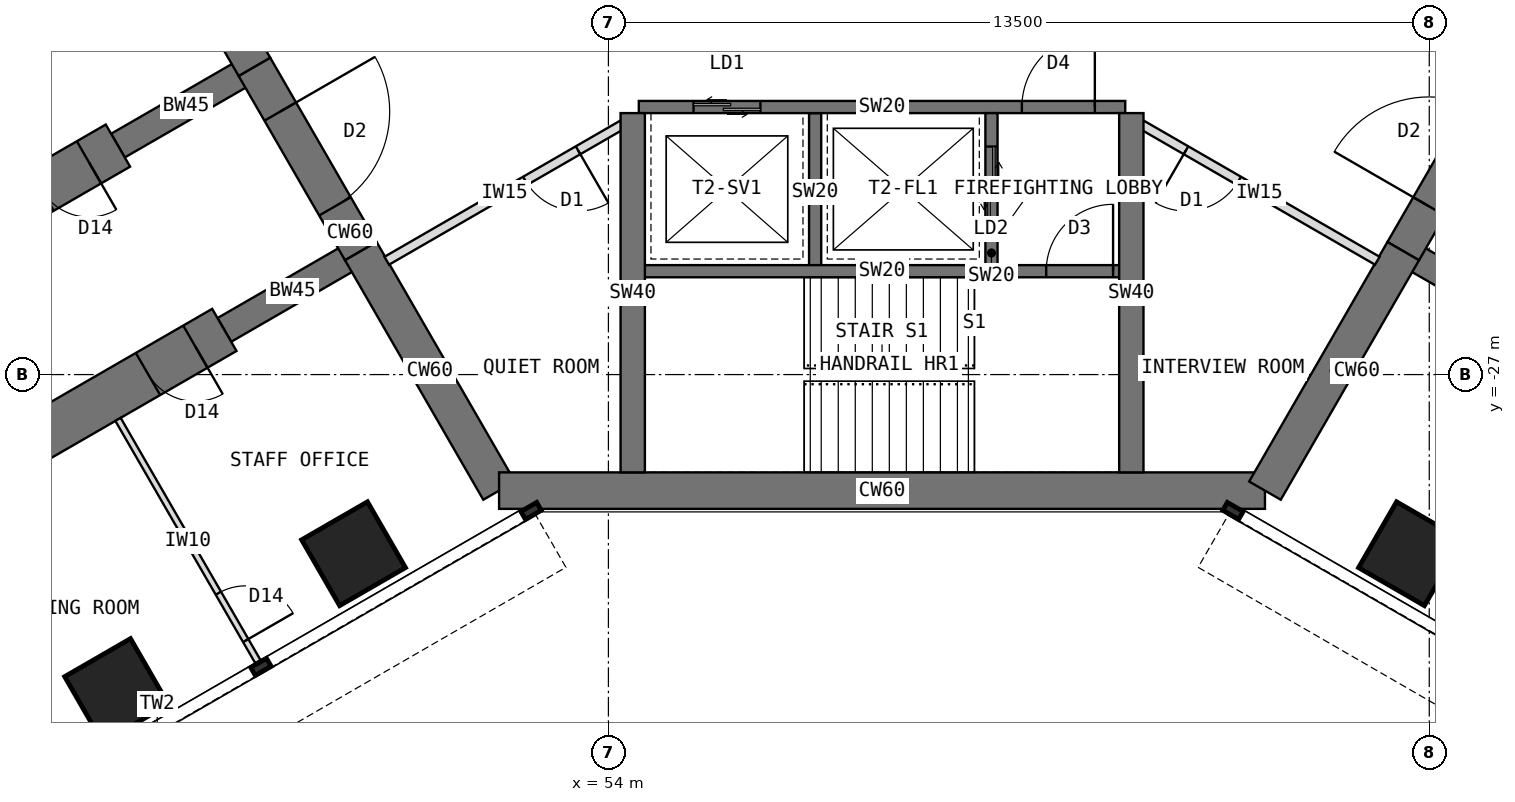
"""IFC4 building model, lengths in metres.
Left out: names, types, materials, properties, quantities, classifications, styles, units other than length and angle.
Written with IfcOpenShell. Run it as: python <this file> out.ifc"""

import sys

from ifc_helpers import new_model, si_unit, direction, frame, frame_2d, origin, origin_2d, place, context, subcontext, project, spatial, rectangle, extrude, element, fill, save


model = new_model("IFC4")
c1 = context("Model", 3, precision=1e-05, world=origin(), true_north=direction((0.0, 1.0)))
c2 = subcontext(c1, "Body", "Model", "MODEL_VIEW")
j1 = project(units=[si_unit("LENGTHUNIT", "METRE"), si_unit("PLANEANGLEUNIT", "RADIAN")], contexts=[c1])
p1 = place(None, origin())
s1 = spatial("IfcSite", under=j1, at=p1, CompositionType="ELEMENT")
p2 = place(p1, origin())
s2 = spatial("IfcBuilding", under=s1, at=p2, CompositionType="ELEMENT")
p3 = place(p2, frame((0.0, 0.0, 161.5)))
s3 = spatial("IfcBuildingStorey", under=s2, at=p3, CompositionType="ELEMENT", Elevation=161.5)
p4 = place(p3, frame((45.904, -18.0, 0.0), z_axis=(0.0, 0.0, 1.0), x_axis=(0.500024481964, -0.866011268655, 0.0)))
e1 = element("IfcWall", 1, at=p4, inside=s3, PredefinedType="SHEAR", context=c2, shape_type="SweptSolid", body=[
    extrude(rectangle(XDim=4.548, YDim=0.6, at=frame_2d((2.274, 0.0))), origin(), (0.0, 0.0, 1.0), 4.0),
])
p5 = place(p3, frame((48.178, -21.939, 0.0), z_axis=(0.0, 0.0, 1.0), x_axis=(0.500010275428, -0.866019471182, 0.0)))
e2 = element("IfcWall", 2, at=p5, inside=s3, PredefinedType="SHEAR", context=c2, shape_type="SweptSolid", body=[
    extrude(rectangle(XDim=3.5, YDim=0.6, at=frame_2d((1.75, 0.0))), origin(), (0.0, 0.0, 1.0), 4.0),
])
p6 = place(p5, frame((0.85, 0.0, 0.0)))
e3 = element("IfcOpeningElement", 3, at=p6, cuts=e2, PredefinedType="OPENING", context=c2, shape_type="SweptSolid", body=[
    extrude(rectangle(XDim=1.8, YDim=2.1, at=frame_2d((0.9, 1.05))), frame((0.0, 0.31, 0.0), z_axis=(0.0, -1.0, 0.0), x_axis=(1.0, 0.0, 0.0)), (0.0, 0.0, 1.0), 0.62),
])
p7 = place(p3, frame((49.928, -24.97, 0.0), z_axis=(0.0, 0.0, 1.0), x_axis=(0.499984222037, -0.866034513004, 0.0)))
e4 = element("IfcWall", 4, at=p7, inside=s3, PredefinedType="SHEAR", context=c2, shape_type="SweptSolid", body=[
    extrude(rectangle(XDim=4.548, YDim=0.6, at=frame_2d((2.274, 0.0))), origin(), (0.0, 0.0, 1.0), 4.0),
])
p8 = place(p3, frame((52.202, -28.908, 0.0), z_axis=(0.0, 0.0, 1.0), x_axis=(1.0, 0.0, 0.0)))
e5 = element("IfcWall", 5, at=p8, inside=s3, PredefinedType="SHEAR", context=c2, shape_type="SweptSolid", body=[
    extrude(rectangle(XDim=12.596, YDim=0.6, at=frame_2d((6.298, 0.0))), origin(), (0.0, 0.0, 1.0), 4.0),
])
p9 = place(p3, frame((64.798, -28.908, 0.0), z_axis=(0.0, 0.0, 1.0), x_axis=(0.499984222037, 0.866034513004, 0.0)))
e6 = element("IfcWall", 6, at=p9, inside=s3, PredefinedType="SHEAR", context=c2, shape_type="SweptSolid", body=[
    extrude(rectangle(XDim=4.548, YDim=0.6, at=frame_2d((2.274, 0.0))), origin(), (0.0, 0.0, 1.0), 4.0),
])
p10 = place(p3, frame((67.072, -24.97, 0.0), z_axis=(0.0, 0.0, 1.0), x_axis=(0.500010275428, 0.866019471182, 0.0)))
e7 = element("IfcWall", 7, at=p10, inside=s3, PredefinedType="SHEAR", context=c2, shape_type="SweptSolid", body=[
    extrude(rectangle(XDim=3.5, YDim=0.6, at=frame_2d((1.75, 0.0))), origin(), (0.0, 0.0, 1.0), 4.0),
])
p11 = place(p10, frame((0.85, 0.0, 0.0)))
e8 = element("IfcOpeningElement", 8, at=p11, cuts=e7, PredefinedType="OPENING", context=c2, shape_type="SweptSolid", body=[
    extrude(rectangle(XDim=1.8, YDim=2.1, at=frame_2d((0.9, 1.05))), frame((0.0, 0.31, 0.0), z_axis=(0.0, -1.0, 0.0), x_axis=(1.0, 0.0, 0.0)), (0.0, 0.0, 1.0), 0.62),
])
p12 = place(p3, frame((49.928, -24.97, 0.0), z_axis=(0.0, 0.0, 1.0), x_axis=(-0.866031863473, -0.499988811324, 0.0)))
e9 = element("IfcWall", 9, at=p12, inside=s3, PredefinedType="SHEAR", context=c2, shape_type="SweptSolid", body=[
    extrude(rectangle(XDim=2.592, YDim=0.45, at=frame_2d((1.296, 0.0))), origin(), (0.0, 0.0, 1.0), 4.0),
])
p13 = place(p3, frame((47.684, -26.266, 0.0), z_axis=(0.0, 0.0, 1.0), x_axis=(-0.866027579429, -0.499996231654, 0.0)))
e10 = element("IfcWall", 10, at=p13, inside=s3, PredefinedType="SHEAR", context=c2, shape_type="SweptSolid", body=[
    extrude(rectangle(XDim=13.2, YDim=0.8, at=frame_2d((6.6, 0.0))), origin(), (0.0, 0.0, 1.0), 4.0),
])
p14 = place(p13, frame((0.55, 0.0, 0.0)))
e11 = element("IfcOpeningElement", 11, at=p14, cuts=e10, PredefinedType="OPENING", context=c2, shape_type="SweptSolid", body=[
    extrude(rectangle(XDim=0.9, YDim=2.1, at=frame_2d((0.45, 1.05))), frame((0.0, 0.41, 0.0), z_axis=(0.0, -1.0, 0.0), x_axis=(1.0, 0.0, 0.0)), (0.0, 0.0, 1.0), 0.82),
])
p15 = place(p13, frame((7.3, 0.0, 0.0)))
e12 = element("IfcOpeningElement", 12, at=p15, cuts=e10, PredefinedType="OPENING", context=c2, shape_type="SweptSolid", body=[
    extrude(rectangle(XDim=0.9, YDim=2.1, at=frame_2d((0.45, 1.05))), frame((0.0, 0.41, 0.0), z_axis=(0.0, -1.0, 0.0), x_axis=(1.0, 0.0, 0.0)), (0.0, 0.0, 1.0), 0.82),
])
p16 = place(p3, frame((48.178, -21.939, 0.0), z_axis=(0.0, 0.0, 1.0), x_axis=(-0.866072649678, -0.499918158782, 0.0)))
e13 = element("IfcWall", 13, at=p16, inside=s3, PredefinedType="SHEAR", context=c2, shape_type="SweptSolid", body=[
    extrude(rectangle(XDim=2.592, YDim=0.45, at=frame_2d((1.296, 0.0))), origin(), (0.0, 0.0, 1.0), 4.0),
])
p17 = place(p3, frame((45.934, -23.234, 0.0), z_axis=(0.0, 0.0, 1.0), x_axis=(-0.866019570528, -0.500010103361, 0.0)))
e14 = element("IfcWall", 14, at=p17, inside=s3, PredefinedType="SHEAR", context=c2, shape_type="SweptSolid", body=[
    extrude(rectangle(XDim=13.2, YDim=0.8, at=frame_2d((6.6, 0.0))), origin(), (0.0, 0.0, 1.0), 4.0),
])
p18 = place(p17, frame((0.55, 0.0, 0.0)))
e15 = element("IfcOpeningElement", 15, at=p18, cuts=e14, PredefinedType="OPENING", context=c2, shape_type="SweptSolid", body=[
    extrude(rectangle(XDim=0.9, YDim=2.1, at=frame_2d((0.45, 1.05))), frame((0.0, 0.41, 0.0), z_axis=(0.0, -1.0, 0.0), x_axis=(1.0, 0.0, 0.0)), (0.0, 0.0, 1.0), 0.82),
])
p19 = place(p17, frame((7.3, 0.0, 0.0)))
e16 = element("IfcOpeningElement", 16, at=p19, cuts=e14, PredefinedType="OPENING", context=c2, shape_type="SweptSolid", body=[
    extrude(rectangle(XDim=0.9, YDim=2.1, at=frame_2d((0.45, 1.05))), frame((0.0, 0.41, 0.0), z_axis=(0.0, -1.0, 0.0), x_axis=(1.0, 0.0, 0.0)), (0.0, 0.0, 1.0), 0.82),
])
p20 = place(p3, frame((67.072, -24.97, 0.0), z_axis=(0.0, 0.0, 1.0), x_axis=(0.866031863473, -0.499988811324, 0.0)))
e17 = element("IfcWall", 17, at=p20, inside=s3, PredefinedType="SHEAR", context=c2, shape_type="SweptSolid", body=[
    extrude(rectangle(XDim=2.592, YDim=0.45, at=frame_2d((1.296, 0.0))), origin(), (0.0, 0.0, 1.0), 4.0),
])
for number, where, z_axis, x_axis in (
    (18, (49.809, -29.946, 0.0), (0.0, 0.0, 1.0), (0.866, 0.5, 0.0)),
    (19, (45.912, -32.196, 0.0), (0.0, 0.0, 1.0), (0.866, 0.5, 0.0)),
    (20, (67.191, -29.946, 0.0), (0.0, 0.0, 1.0), (0.5, 0.866, 0.0)),
):
    element("IfcColumn", number, at=place(p3, frame(where, z_axis=z_axis, x_axis=x_axis)), inside=s3, PredefinedType="COLUMN", context=c2, shape_type="SweptSolid", body=[
        extrude(rectangle(XDim=1.25, YDim=1.25, at=origin_2d()), origin(), (0.0, 0.0, 1.0), 4.0),
    ])
p21 = place(p3, frame((54.5, -22.6, 0.0), z_axis=(0.0, 0.0, 1.0), x_axis=(1.0, 0.0, 0.0)))
e21 = element("IfcWall", 21, at=p21, inside=s3, PredefinedType="SHEAR", context=c2, shape_type="SweptSolid", body=[
    extrude(rectangle(XDim=8.0, YDim=0.2, at=frame_2d((4.0, 0.0))), origin(), (0.0, 0.0, 1.0), 4.0),
])
p22 = place(p21, frame((6.3, 0.0, 0.0)))
e22 = element("IfcOpeningElement", 22, at=p22, cuts=e21, PredefinedType="OPENING", context=c2, shape_type="SweptSolid", body=[
    extrude(rectangle(XDim=1.2, YDim=2.1, at=frame_2d((0.6, 1.05))), frame((0.0, 0.11, 0.0), z_axis=(0.0, -1.0, 0.0), x_axis=(1.0, 0.0, 0.0)), (0.0, 0.0, 1.0), 0.22),
])
p23 = place(p21, frame((0.9, 0.0, 0.0)))
e23 = element("IfcOpeningElement", 23, at=p23, cuts=e21, PredefinedType="OPENING", context=c2, shape_type="SweptSolid", body=[
    extrude(rectangle(XDim=1.1, YDim=2.2, at=frame_2d((0.55, 1.1))), frame((0.0, 0.11, 0.0), z_axis=(0.0, -1.0, 0.0), x_axis=(1.0, 0.0, 0.0)), (0.0, 0.0, 1.0), 0.22),
])
p24 = place(p3, frame((57.4, -22.7, 0.0), z_axis=(0.0, 0.0, 1.0), x_axis=(0.0, -1.0, 0.0)))
e24 = element("IfcWall", 24, at=p24, inside=s3, PredefinedType="SHEAR", context=c2, shape_type="SweptSolid", body=[
    extrude(rectangle(XDim=2.6, YDim=0.2, at=frame_2d((1.3, 0.0))), origin(), (0.0, 0.0, 1.0), 4.0),
])
p25 = place(p3, frame((60.3, -22.7, 0.0), z_axis=(0.0, 0.0, 1.0), x_axis=(0.0, -1.0, 0.0)))
e25 = element("IfcWall", 25, at=p25, inside=s3, PredefinedType="SHEAR", context=c2, shape_type="SweptSolid", body=[
    extrude(rectangle(XDim=2.6, YDim=0.2, at=frame_2d((1.3, 0.0))), origin(), (0.0, 0.0, 1.0), 4.0),
])
p26 = place(p25, frame((0.55, 0.0, 0.0)))
e26 = element("IfcOpeningElement", 26, at=p26, cuts=e25, PredefinedType="OPENING", context=c2, shape_type="SweptSolid", body=[
    extrude(rectangle(XDim=1.3, YDim=2.2, at=frame_2d((0.65, 1.1))), frame((0.0, 0.11, 0.0), z_axis=(0.0, -1.0, 0.0), x_axis=(1.0, 0.0, 0.0)), (0.0, 0.0, 1.0), 0.22),
])
p27 = place(p3, frame((54.5, -25.3, 0.0), z_axis=(0.0, 0.0, 1.0), x_axis=(1.0, 0.0, 0.0)))
e27 = element("IfcWall", 27, at=p27, inside=s3, PredefinedType="SHEAR", context=c2, shape_type="SweptSolid", body=[
    extrude(rectangle(XDim=8.0, YDim=0.2, at=frame_2d((4.0, 0.0))), origin(), (0.0, 0.0, 1.0), 4.0),
])
p28 = place(p27, frame((6.7, 0.0, 0.0)))
e28 = element("IfcOpeningElement", 28, at=p28, cuts=e27, PredefinedType="OPENING", context=c2, shape_type="SweptSolid", body=[
    extrude(rectangle(XDim=1.1, YDim=2.1, at=frame_2d((0.55, 1.05))), frame((0.0, 0.11, 0.0), z_axis=(0.0, -1.0, 0.0), x_axis=(1.0, 0.0, 0.0)), (0.0, 0.0, 1.0), 0.22),
])
for number, where, z_axis, x_axis in (
    (29, (62.6, -22.7, 0.0), (0.0, 0.0, 1.0), (0.0, -1.0, 0.0)),
    (30, (54.4, -22.7, 0.0), (0.0, 0.0, 1.0), (0.0, -1.0, 0.0)),
):
    element("IfcWall", number, at=place(p3, frame(where, z_axis=z_axis, x_axis=x_axis)), inside=s3, PredefinedType="SHEAR", context=c2, shape_type="SweptSolid", body=[
        extrude(rectangle(XDim=5.908, YDim=0.4, at=frame_2d((2.954, 0.0))), origin(), (0.0, 0.0, 1.0), 4.0),
    ])
p29 = place(p3, frame((45.935, -27.737, 0.0), z_axis=(0.0, 0.0, 1.0), x_axis=(0.500014953309, -0.866016770315, 0.0)))
e31 = element("IfcWall", 31, at=p29, inside=s3, PredefinedType="PARTITIONING", context=c2, shape_type="SweptSolid", body=[
    extrude(rectangle(XDim=4.6, YDim=0.1, at=frame_2d((2.3, 0.0))), origin(), (0.0, 0.0, 1.0), 3.7),
])
p30 = place(p29, frame((3.3, 0.0, 0.0)))
e32 = element("IfcOpeningElement", 32, at=p30, cuts=e31, PredefinedType="OPENING", context=c2, shape_type="SweptSolid", body=[
    extrude(rectangle(XDim=0.9, YDim=2.1, at=frame_2d((0.45, 1.05))), frame((0.0, 0.06, 0.0), z_axis=(0.0, -1.0, 0.0), x_axis=(1.0, 0.0, 0.0)), (0.0, 0.0, 1.0), 0.12),
])
p31 = place(p3, frame((66.646, -25.128, 0.0), z_axis=(0.0, 0.0, 1.0), x_axis=(-0.866025707867, 0.499999473313, 0.0)))
e33 = element("IfcWall", 33, at=p31, inside=s3, PredefinedType="PARTITIONING", context=c2, shape_type="SweptSolid", body=[
    extrude(rectangle(XDim=4.476, YDim=0.15, at=frame_2d((2.238, 0.0))), origin(), (0.0, 0.0, 1.0), 3.7),
])
p32 = place(p31, frame((2.633, 0.0, 0.0)))
e34 = element("IfcOpeningElement", 34, at=p32, cuts=e33, PredefinedType="OPENING", context=c2, shape_type="SweptSolid", body=[
    extrude(rectangle(XDim=1.0, YDim=2.1, at=frame_2d((0.5, 1.05))), frame((0.0, 0.085, 0.0), z_axis=(0.0, -1.0, 0.0), x_axis=(1.0, 0.0, 0.0)), (0.0, 0.0, 1.0), 0.17),
])
p33 = place(p3, frame((54.23, -22.89, 0.0), z_axis=(0.0, 0.0, 1.0), x_axis=(-0.866025707867, -0.499999473313, 0.0)))
e35 = element("IfcWall", 35, at=p33, inside=s3, PredefinedType="PARTITIONING", context=c2, shape_type="SweptSolid", body=[
    extrude(rectangle(XDim=4.476, YDim=0.15, at=frame_2d((2.238, 0.0))), origin(), (0.0, 0.0, 1.0), 3.7),
])
p34 = place(p33, frame((0.843, 0.0, 0.0)))
e36 = element("IfcOpeningElement", 36, at=p34, cuts=e35, PredefinedType="OPENING", context=c2, shape_type="SweptSolid", body=[
    extrude(rectangle(XDim=1.0, YDim=2.1, at=frame_2d((0.5, 1.05))), frame((0.0, 0.085, 0.0), z_axis=(0.0, -1.0, 0.0), x_axis=(1.0, 0.0, 0.0)), (0.0, 0.0, 1.0), 0.17),
])
p35 = place(p22, origin())
e37 = element("IfcDoor", 37, at=p35, inside=s3, OperationType="SINGLE_SWING_RIGHT", PredefinedType="DOOR", context=c2, shape_type="SweptSolid", body=[
    extrude(rectangle(XDim=1.2, YDim=2.1, at=frame_2d((0.6, 1.05))), frame((0.0, 0.025, 0.0), z_axis=(0.0, -1.0, 0.0), x_axis=(1.0, 0.0, 0.0)), (0.0, 0.0, 1.0), 0.05),
])
fill(e22, e37)
p36 = place(p26, origin())
e38 = element("IfcDoor", 38, at=p36, inside=s3, OperationType="DOUBLE_DOOR_SLIDING", PredefinedType="DOOR", context=c2, shape_type="SweptSolid", body=[
    extrude(rectangle(XDim=1.3, YDim=2.2, at=frame_2d((0.65, 1.1))), frame((0.0, 0.025, 0.0), z_axis=(0.0, -1.0, 0.0), x_axis=(1.0, 0.0, 0.0)), (0.0, 0.0, 1.0), 0.05),
])
fill(e26, e38)
p37 = place(p23, origin())
e39 = element("IfcDoor", 39, at=p37, inside=s3, OperationType="DOUBLE_DOOR_SLIDING", PredefinedType="DOOR", context=c2, shape_type="SweptSolid", body=[
    extrude(rectangle(XDim=1.1, YDim=2.2, at=frame_2d((0.55, 1.1))), frame((0.0, 0.025, 0.0), z_axis=(0.0, -1.0, 0.0), x_axis=(1.0, 0.0, 0.0)), (0.0, 0.0, 1.0), 0.05),
])
fill(e23, e39)
p38 = place(p28, origin())
e40 = element("IfcDoor", 40, at=p38, inside=s3, OperationType="SINGLE_SWING_RIGHT", PredefinedType="DOOR", context=c2, shape_type="SweptSolid", body=[
    extrude(rectangle(XDim=1.1, YDim=2.1, at=frame_2d((0.55, 1.05))), frame((0.0, 0.025, 0.0), z_axis=(0.0, -1.0, 0.0), x_axis=(1.0, 0.0, 0.0)), (0.0, 0.0, 1.0), 0.05),
])
fill(e28, e40)
p39 = place(p6, origin())
e41 = element("IfcDoor", 41, at=p39, inside=s3, OperationType="DOUBLE_DOOR_DOUBLE_SWING", PredefinedType="DOOR", context=c2, shape_type="SweptSolid", body=[
    extrude(rectangle(XDim=1.72, YDim=2.06, at=frame_2d((0.9, 1.03))), frame((0.0, 0.025, 0.0), z_axis=(0.0, -1.0, 0.0), x_axis=(1.0, 0.0, 0.0)), (0.0, 0.0, 1.0), 0.05),
    extrude(rectangle(XDim=0.04, YDim=2.1, at=frame_2d((0.02, 1.05))), frame((0.0, 0.3, 0.0), z_axis=(0.0, -1.0, 0.0), x_axis=(1.0, 0.0, 0.0)), (0.0, 0.0, 1.0), 0.6),
    extrude(rectangle(XDim=0.04, YDim=2.1, at=frame_2d((1.78, 1.05))), frame((0.0, 0.3, 0.0), z_axis=(0.0, -1.0, 0.0), x_axis=(1.0, 0.0, 0.0)), (0.0, 0.0, 1.0), 0.6),
    extrude(rectangle(XDim=1.72, YDim=0.04, at=frame_2d((0.9, 2.08))), frame((0.0, 0.3, 0.0), z_axis=(0.0, -1.0, 0.0), x_axis=(1.0, 0.0, 0.0)), (0.0, 0.0, 1.0), 0.6),
])
fill(e3, e41)
p40 = place(p11, origin())
e42 = element("IfcDoor", 42, at=p40, inside=s3, OperationType="DOUBLE_DOOR_DOUBLE_SWING", PredefinedType="DOOR", context=c2, shape_type="SweptSolid", body=[
    extrude(rectangle(XDim=1.72, YDim=2.06, at=frame_2d((0.9, 1.03))), frame((0.0, 0.025, 0.0), z_axis=(0.0, -1.0, 0.0), x_axis=(1.0, 0.0, 0.0)), (0.0, 0.0, 1.0), 0.05),
    extrude(rectangle(XDim=0.04, YDim=2.1, at=frame_2d((0.02, 1.05))), frame((0.0, 0.3, 0.0), z_axis=(0.0, -1.0, 0.0), x_axis=(1.0, 0.0, 0.0)), (0.0, 0.0, 1.0), 0.6),
    extrude(rectangle(XDim=0.04, YDim=2.1, at=frame_2d((1.78, 1.05))), frame((0.0, 0.3, 0.0), z_axis=(0.0, -1.0, 0.0), x_axis=(1.0, 0.0, 0.0)), (0.0, 0.0, 1.0), 0.6),
    extrude(rectangle(XDim=1.72, YDim=0.04, at=frame_2d((0.9, 2.08))), frame((0.0, 0.3, 0.0), z_axis=(0.0, -1.0, 0.0), x_axis=(1.0, 0.0, 0.0)), (0.0, 0.0, 1.0), 0.6),
])
fill(e8, e42)
p41 = place(p30, origin())
e43 = element("IfcDoor", 43, at=p41, inside=s3, OperationType="SINGLE_SWING_RIGHT", PredefinedType="DOOR", context=c2, shape_type="SweptSolid", body=[
    extrude(rectangle(XDim=0.9, YDim=2.1, at=frame_2d((0.45, 1.05))), frame((0.0, 0.025, 0.0), z_axis=(0.0, -1.0, 0.0), x_axis=(1.0, 0.0, 0.0)), (0.0, 0.0, 1.0), 0.05),
])
fill(e32, e43)
p42 = place(p34, origin())
e44 = element("IfcDoor", 44, at=p42, inside=s3, OperationType="SINGLE_SWING_LEFT", PredefinedType="DOOR", context=c2, shape_type="SweptSolid", body=[
    extrude(rectangle(XDim=1.0, YDim=2.1, at=frame_2d((0.5, 1.05))), frame((0.0, 0.025, 0.0), z_axis=(0.0, -1.0, 0.0), x_axis=(1.0, 0.0, 0.0)), (0.0, 0.0, 1.0), 0.05),
])
fill(e36, e44)
p43 = place(p32, origin())
e45 = element("IfcDoor", 45, at=p43, inside=s3, OperationType="SINGLE_SWING_RIGHT", PredefinedType="DOOR", context=c2, shape_type="SweptSolid", body=[
    extrude(rectangle(XDim=1.0, YDim=2.1, at=frame_2d((0.5, 1.05))), frame((0.0, 0.025, 0.0), z_axis=(0.0, -1.0, 0.0), x_axis=(1.0, 0.0, 0.0)), (0.0, 0.0, 1.0), 0.05),
])
fill(e34, e45)
p44 = place(p14, origin())
e46 = element("IfcDoor", 46, at=p44, inside=s3, OperationType="SINGLE_SWING_LEFT", PredefinedType="DOOR", context=c2, shape_type="SweptSolid", body=[
    extrude(rectangle(XDim=0.82, YDim=2.06, at=frame_2d((0.45, 1.03))), frame((0.0, 0.025, 0.0), z_axis=(0.0, -1.0, 0.0), x_axis=(1.0, 0.0, 0.0)), (0.0, 0.0, 1.0), 0.05),
    extrude(rectangle(XDim=0.04, YDim=2.1, at=frame_2d((0.02, 1.05))), frame((0.0, 0.4, 0.0), z_axis=(0.0, -1.0, 0.0), x_axis=(1.0, 0.0, 0.0)), (0.0, 0.0, 1.0), 0.8),
    extrude(rectangle(XDim=0.04, YDim=2.1, at=frame_2d((0.88, 1.05))), frame((0.0, 0.4, 0.0), z_axis=(0.0, -1.0, 0.0), x_axis=(1.0, 0.0, 0.0)), (0.0, 0.0, 1.0), 0.8),
    extrude(rectangle(XDim=0.82, YDim=0.04, at=frame_2d((0.45, 2.08))), frame((0.0, 0.4, 0.0), z_axis=(0.0, -1.0, 0.0), x_axis=(1.0, 0.0, 0.0)), (0.0, 0.0, 1.0), 0.8),
])
fill(e11, e46)
p45 = place(p18, origin())
e47 = element("IfcDoor", 47, at=p45, inside=s3, OperationType="SINGLE_SWING_LEFT", PredefinedType="DOOR", context=c2, shape_type="SweptSolid", body=[
    extrude(rectangle(XDim=0.82, YDim=2.06, at=frame_2d((0.45, 1.03))), frame((0.0, 0.025, 0.0), z_axis=(0.0, -1.0, 0.0), x_axis=(1.0, 0.0, 0.0)), (0.0, 0.0, 1.0), 0.05),
    extrude(rectangle(XDim=0.04, YDim=2.1, at=frame_2d((0.02, 1.05))), frame((0.0, 0.4, 0.0), z_axis=(0.0, -1.0, 0.0), x_axis=(1.0, 0.0, 0.0)), (0.0, 0.0, 1.0), 0.8),
    extrude(rectangle(XDim=0.04, YDim=2.1, at=frame_2d((0.88, 1.05))), frame((0.0, 0.4, 0.0), z_axis=(0.0, -1.0, 0.0), x_axis=(1.0, 0.0, 0.0)), (0.0, 0.0, 1.0), 0.8),
    extrude(rectangle(XDim=0.82, YDim=0.04, at=frame_2d((0.45, 2.08))), frame((0.0, 0.4, 0.0), z_axis=(0.0, -1.0, 0.0), x_axis=(1.0, 0.0, 0.0)), (0.0, 0.0, 1.0), 0.8),
])
fill(e15, e47)
save(model, sys.argv[1])
